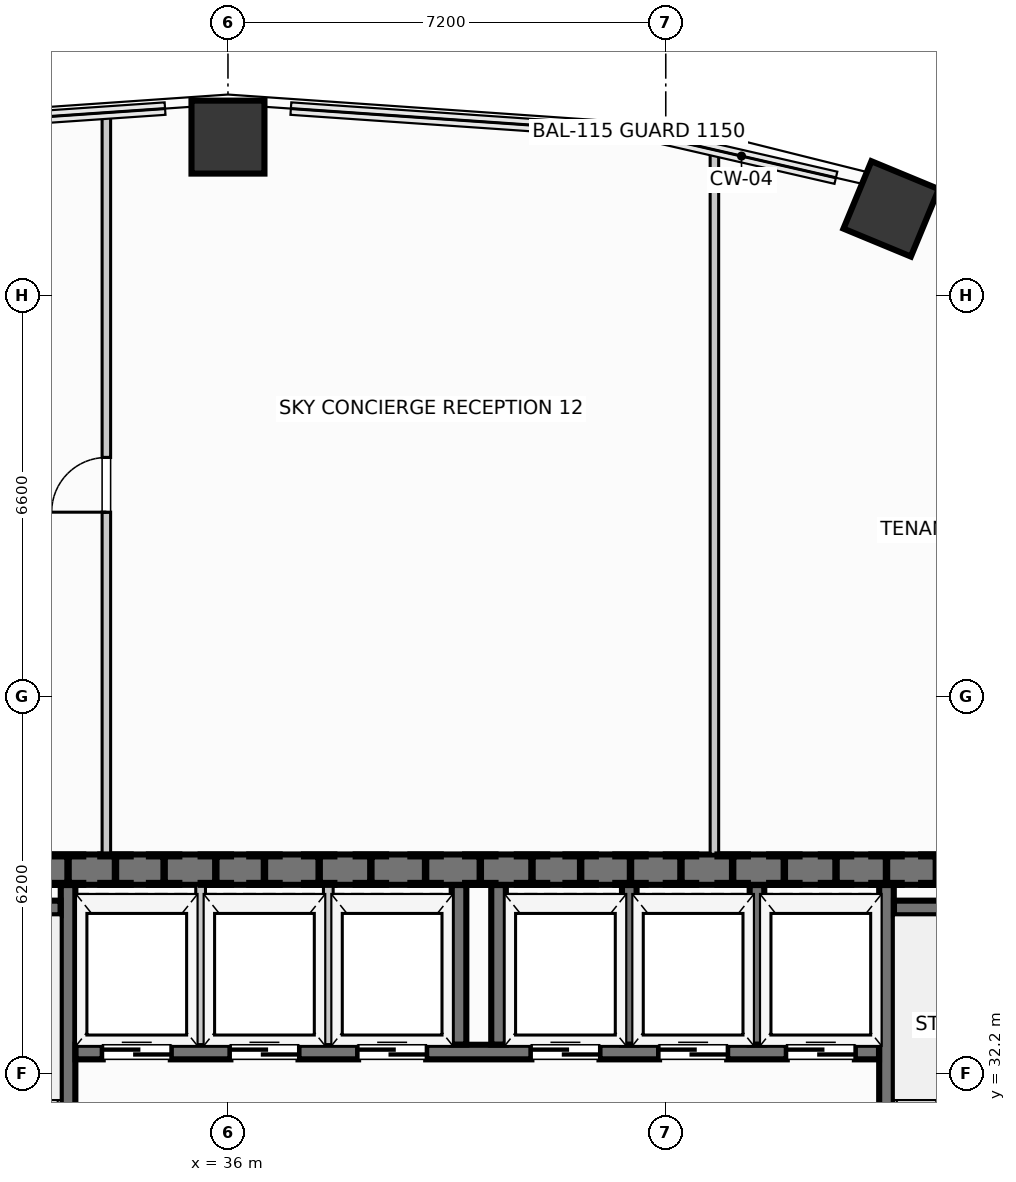
"""IFC4 building model, lengths in metres.
Left out: names, types, materials, properties, quantities, classifications, styles, units other than length and angle.
Written with IfcOpenShell. Run it as: python <this file> out.ifc"""

import sys

from ifc_helpers import new_model, si_unit, direction, frame, frame_2d, origin, origin_2d, place, context, subcontext, project, spatial, rectangle, i_section, extrude, element, fill, save


model = new_model("IFC4")
c1 = context("Model", 3, precision=1e-05, world=origin(), true_north=direction((0.0, 1.0)))
c2 = subcontext(c1, "Body", "Model", "MODEL_VIEW")
j1 = project(units=[si_unit("LENGTHUNIT", "METRE"), si_unit("PLANEANGLEUNIT", "RADIAN")], contexts=[c1])
p1 = place(None, origin())
s1 = spatial("IfcSite", under=j1, at=p1, CompositionType="ELEMENT")
p2 = place(p1, origin())
s2 = spatial("IfcBuilding", under=s1, at=p2, CompositionType="ELEMENT")
p3 = place(p2, frame((0.0, 0.0, 105.95)))
s3 = spatial("IfcBuildingStorey", under=s2, at=p3, CompositionType="ELEMENT", Elevation=105.95)
for number, where, z_axis, x_axis in (
    (1, (33.37, 35.55, 0.0), (0.0, 0.0, 1.0), (1.0, 0.0, 0.0)),
    (2, (34.95, 35.55, 0.0), (0.0, 0.0, 1.0), (1.0, 0.0, 0.0)),
    (3, (36.6, 35.55, 0.0), (0.0, 0.0, 1.0), (1.0, 0.0, 0.0)),
    (4, (38.35, 35.55, 0.0), (0.0, 0.0, 1.0), (1.0, 0.0, 0.0)),
    (5, (40.15, 35.55, 0.0), (0.0, 0.0, 1.0), (1.0, 0.0, 0.0)),
    (6, (41.8, 35.55, 0.0), (0.0, 0.0, 1.0), (1.0, 0.0, 0.0)),
    (7, (43.45, 35.55, 0.0), (0.0, 0.0, 1.0), (1.0, 0.0, 0.0)),
    (8, (45.15, 35.55, 0.0), (0.0, 0.0, 1.0), (1.0, 0.0, 0.0)),
    (9, (46.83, 35.55, 0.0), (0.0, 0.0, 1.0), (1.0, 0.0, 0.0)),
    (10, (37.5, 35.55, 0.0), (0.0, 0.0, 1.0), (1.0, 0.0, 0.0)),
    (11, (42.62, 35.55, 0.0), (0.0, 0.0, 1.0), (1.0, 0.0, 0.0)),
    (12, (47.65, 35.55, 0.0), (0.0, 0.0, 1.0), (1.0, 0.0, 0.0)),
    (13, (34.15, 35.55, 0.0), (0.0, 0.0, 1.0), (1.0, 0.0, 0.0)),
    (14, (35.8, 35.55, 0.0), (0.0, 0.0, 1.0), (1.0, 0.0, 0.0)),
    (15, (39.25, 35.55, 0.0), (0.0, 0.0, 1.0), (1.0, 0.0, 0.0)),
    (16, (41.0, 35.55, 0.0), (0.0, 0.0, 1.0), (1.0, 0.0, 0.0)),
    (17, (44.3, 35.55, 0.0), (0.0, 0.0, 1.0), (1.0, 0.0, 0.0)),
    (18, (46.0, 35.55, 0.0), (0.0, 0.0, 1.0), (1.0, 0.0, 0.0)),
):
    element("IfcColumn", number, at=place(p3, frame(where, z_axis=z_axis, x_axis=x_axis)), inside=s3, PredefinedType="COLUMN", context=c2, shape_type="SweptSolid", body=[
        extrude(i_section(OverallWidth=0.5, OverallDepth=0.5, WebThickness=0.022, FlangeThickness=0.032, at=origin_2d()), origin(), (0.0, 0.0, 1.0), 4.5),
    ])
for number, where, z_axis, x_axis in (
    (19, (46.906, 46.418, 0.0), (0.0, 0.0, 1.0), (0.383, 0.924, 0.0)),
    (20, (36.0, 47.598, 0.0), (0.0, 0.0, 1.0), (0.0, 1.0, 0.0)),
):
    element("IfcColumn", number, at=place(p3, frame(where, z_axis=z_axis, x_axis=x_axis)), inside=s3, PredefinedType="COLUMN", context=c2, shape_type="SweptSolid", body=[
        extrude(rectangle(XDim=1.2, YDim=1.2, at=origin_2d()), origin(), (0.0, 0.0, 1.0), 4.5),
    ])
p4 = place(p3, frame((50.35, 35.55, 0.0), z_axis=(0.0, 0.0, 1.0), x_axis=(-1.0, 0.0, 0.0)))
e21 = element("IfcWall", 21, at=p4, inside=s3, PredefinedType="SHEAR", context=c2, shape_type="SweptSolid", body=[
    extrude(rectangle(XDim=28.7, YDim=0.5, at=frame_2d((14.35, 0.0))), origin(), (0.0, 0.0, 1.0), 4.5),
])
p5 = place(p3, frame((33.37, 27.003, 0.0), z_axis=(0.0, 0.0, 1.0), x_axis=(0.0, 1.0, 0.0)))
e22 = element("IfcWall", 22, at=p5, inside=s3, PredefinedType="SHEAR", context=c2, shape_type="SweptSolid", body=[
    extrude(rectangle(XDim=8.294, YDim=0.24, at=frame_2d((4.147, 0.0))), origin(), (0.0, 0.0, 1.0), 4.5),
])
p6 = place(p3, frame((30.253, 34.92, 0.0), z_axis=(0.0, 0.0, 1.0), x_axis=(1.0, 0.0, 0.0)))
e23 = element("IfcWall", 23, at=p6, inside=s3, PredefinedType="SHEAR", context=c2, shape_type="SweptSolid", body=[
    extrude(rectangle(XDim=2.994, YDim=0.24, at=frame_2d((1.497, 0.0))), origin(), (0.0, 0.0, 1.0), 4.5),
])
p7 = place(p3, frame((46.83, 27.003, 0.0), z_axis=(0.0, 0.0, 1.0), x_axis=(0.0, 1.0, 0.0)))
e24 = element("IfcWall", 24, at=p7, inside=s3, PredefinedType="SHEAR", context=c2, shape_type="SweptSolid", body=[
    extrude(rectangle(XDim=8.294, YDim=0.24, at=frame_2d((4.147, 0.0))), origin(), (0.0, 0.0, 1.0), 4.5),
])
p8 = place(p3, frame((46.953, 34.92, 0.0), z_axis=(0.0, 0.0, 1.0), x_axis=(1.0, 0.0, 0.0)))
e25 = element("IfcWall", 25, at=p8, inside=s3, PredefinedType="SHEAR", context=c2, shape_type="SweptSolid", body=[
    extrude(rectangle(XDim=2.994, YDim=0.24, at=frame_2d((1.497, 0.0))), origin(), (0.0, 0.0, 1.0), 4.5),
])
p9 = place(p3, frame((33.493, 32.55, 0.0), z_axis=(0.0, 0.0, 1.0), x_axis=(1.0, 0.0, 0.0)))
e26 = element("IfcWall", 26, at=p9, inside=s3, PredefinedType="SHEAR", context=c2, shape_type="SweptSolid", body=[
    extrude(rectangle(XDim=13.214, YDim=0.24, at=frame_2d((6.607, 0.0))), origin(), (0.0, 0.0, 1.0), 4.5),
])
p10 = place(p9, frame((0.447, 0.0, 0.0)))
e27 = element("IfcOpeningElement", 27, at=p10, cuts=e26, PredefinedType="OPENING", context=c2, shape_type="SweptSolid", body=[
    extrude(rectangle(XDim=1.12, YDim=2.0, at=frame_2d((0.56, 1.0))), frame((0.0, 0.13, 0.0), z_axis=(0.0, -1.0, 0.0), x_axis=(1.0, 0.0, 0.0)), (0.0, 0.0, 1.0), 0.26),
])
p11 = place(p9, frame((2.547, 0.0, 0.0)))
e28 = element("IfcOpeningElement", 28, at=p11, cuts=e26, PredefinedType="OPENING", context=c2, shape_type="SweptSolid", body=[
    extrude(rectangle(XDim=1.12, YDim=2.0, at=frame_2d((0.56, 1.0))), frame((0.0, 0.13, 0.0), z_axis=(0.0, -1.0, 0.0), x_axis=(1.0, 0.0, 0.0)), (0.0, 0.0, 1.0), 0.26),
])
p12 = place(p9, frame((4.647, 0.0, 0.0)))
e29 = element("IfcOpeningElement", 29, at=p12, cuts=e26, PredefinedType="OPENING", context=c2, shape_type="SweptSolid", body=[
    extrude(rectangle(XDim=1.12, YDim=2.0, at=frame_2d((0.56, 1.0))), frame((0.0, 0.13, 0.0), z_axis=(0.0, -1.0, 0.0), x_axis=(1.0, 0.0, 0.0)), (0.0, 0.0, 1.0), 0.26),
])
p13 = place(p9, frame((7.497, 0.0, 0.0)))
e30 = element("IfcOpeningElement", 30, at=p13, cuts=e26, PredefinedType="OPENING", context=c2, shape_type="SweptSolid", body=[
    extrude(rectangle(XDim=1.12, YDim=2.0, at=frame_2d((0.56, 1.0))), frame((0.0, 0.13, 0.0), z_axis=(0.0, -1.0, 0.0), x_axis=(1.0, 0.0, 0.0)), (0.0, 0.0, 1.0), 0.26),
])
p14 = place(p9, frame((9.597, 0.0, 0.0)))
e31 = element("IfcOpeningElement", 31, at=p14, cuts=e26, PredefinedType="OPENING", context=c2, shape_type="SweptSolid", body=[
    extrude(rectangle(XDim=1.12, YDim=2.0, at=frame_2d((0.56, 1.0))), frame((0.0, 0.13, 0.0), z_axis=(0.0, -1.0, 0.0), x_axis=(1.0, 0.0, 0.0)), (0.0, 0.0, 1.0), 0.26),
])
p15 = place(p9, frame((11.697, 0.0, 0.0)))
e32 = element("IfcOpeningElement", 32, at=p15, cuts=e26, PredefinedType="OPENING", context=c2, shape_type="SweptSolid", body=[
    extrude(rectangle(XDim=1.12, YDim=2.0, at=frame_2d((0.56, 1.0))), frame((0.0, 0.13, 0.0), z_axis=(0.0, -1.0, 0.0), x_axis=(1.0, 0.0, 0.0)), (0.0, 0.0, 1.0), 0.26),
])
for number, where, z_axis, x_axis in (
    (33, (39.8, 32.673, 0.0), (0.0, 0.0, 1.0), (0.0, 1.0, 0.0)),
    (34, (40.45, 32.673, 0.0), (0.0, 0.0, 1.0), (0.0, 1.0, 0.0)),
    (35, (42.6, 32.673, 0.0), (0.0, 0.0, 1.0), (0.0, 1.0, 0.0)),
    (36, (44.7, 32.673, 0.0), (0.0, 0.0, 1.0), (0.0, 1.0, 0.0)),
):
    element("IfcWall", number, at=place(p3, frame(where, z_axis=z_axis, x_axis=x_axis)), inside=s3, PredefinedType="SHEAR", context=c2, shape_type="SweptSolid", body=[
        extrude(rectangle(XDim=2.624, YDim=0.24, at=frame_2d((1.312, 0.0))), origin(), (0.0, 0.0, 1.0), 4.5),
    ])
for number, where, z_axis, x_axis in (
    (37, (35.55, 32.673, 0.0), (0.0, 0.0, 1.0), (0.0, 1.0, 0.0)),
    (38, (37.65, 32.673, 0.0), (0.0, 0.0, 1.0), (0.0, 1.0, 0.0)),
):
    element("IfcWall", number, at=place(p3, frame(where, z_axis=z_axis, x_axis=x_axis)), inside=s3, PredefinedType="MOVABLE", context=c2, shape_type="SweptSolid", body=[
        extrude(rectangle(XDim=2.624, YDim=0.16, at=frame_2d((1.312, 0.0))), origin(), (0.0, 0.0, 1.0), 4.245),
    ])
p16 = place(p3, frame((34.0, 35.803, 0.0), z_axis=(0.0, 0.0, 1.0), x_axis=(0.0, 1.0, 0.0)))
e39 = element("IfcWall", 39, at=p16, inside=s3, PredefinedType="PARTITIONING", context=c2, shape_type="SweptSolid", body=[
    extrude(rectangle(XDim=12.133, YDim=0.14, at=frame_2d((6.066, 0.0))), origin(), (0.0, 0.0, 1.0), 4.245),
])
p17 = place(p16, frame((5.626, 0.0, 0.0)))
e40 = element("IfcOpeningElement", 40, at=p17, cuts=e39, PredefinedType="OPENING", context=c2, shape_type="SweptSolid", body=[
    extrude(rectangle(XDim=0.9, YDim=2.0, at=frame_2d((0.45, 1.0))), frame((0.0, 0.08, 0.0), z_axis=(0.0, -1.0, 0.0), x_axis=(1.0, 0.0, 0.0)), (0.0, 0.0, 1.0), 0.16),
])
p18 = place(p3, frame((44.0, 35.803, 0.0), z_axis=(0.0, 0.0, 1.0), x_axis=(0.0, 1.0, 0.0)))
e41 = element("IfcWall", 41, at=p18, inside=s3, PredefinedType="PARTITIONING", context=c2, shape_type="SweptSolid", body=[
    extrude(rectangle(XDim=11.519, YDim=0.14, at=frame_2d((5.76, 0.0))), origin(), (0.0, 0.0, 1.0), 4.245),
])
p19 = place(p10, origin())
e42 = element("IfcDoor", 42, at=p19, inside=s3, OperationType="DOUBLE_DOOR_SLIDING", PredefinedType="USERDEFINED", context=c2, shape_type="SweptSolid", body=[
    extrude(rectangle(XDim=1.12, YDim=2.0, at=frame_2d((0.56, 1.0))), frame((0.0, 0.025, 0.0), z_axis=(0.0, -1.0, 0.0), x_axis=(1.0, 0.0, 0.0)), (0.0, 0.0, 1.0), 0.05),
])
fill(e27, e42)
p20 = place(p11, origin())
e43 = element("IfcDoor", 43, at=p20, inside=s3, OperationType="DOUBLE_DOOR_SLIDING", PredefinedType="USERDEFINED", context=c2, shape_type="SweptSolid", body=[
    extrude(rectangle(XDim=1.12, YDim=2.0, at=frame_2d((0.56, 1.0))), frame((0.0, 0.025, 0.0), z_axis=(0.0, -1.0, 0.0), x_axis=(1.0, 0.0, 0.0)), (0.0, 0.0, 1.0), 0.05),
])
fill(e28, e43)
p21 = place(p12, origin())
e44 = element("IfcDoor", 44, at=p21, inside=s3, OperationType="DOUBLE_DOOR_SLIDING", PredefinedType="USERDEFINED", context=c2, shape_type="SweptSolid", body=[
    extrude(rectangle(XDim=1.12, YDim=2.0, at=frame_2d((0.56, 1.0))), frame((0.0, 0.025, 0.0), z_axis=(0.0, -1.0, 0.0), x_axis=(1.0, 0.0, 0.0)), (0.0, 0.0, 1.0), 0.05),
])
fill(e29, e44)
p22 = place(p13, origin())
e45 = element("IfcDoor", 45, at=p22, inside=s3, OperationType="DOUBLE_DOOR_SLIDING", PredefinedType="USERDEFINED", context=c2, shape_type="SweptSolid", body=[
    extrude(rectangle(XDim=1.12, YDim=2.0, at=frame_2d((0.56, 1.0))), frame((0.0, 0.025, 0.0), z_axis=(0.0, -1.0, 0.0), x_axis=(1.0, 0.0, 0.0)), (0.0, 0.0, 1.0), 0.05),
])
fill(e30, e45)
p23 = place(p14, origin())
e46 = element("IfcDoor", 46, at=p23, inside=s3, OperationType="DOUBLE_DOOR_SLIDING", PredefinedType="USERDEFINED", context=c2, shape_type="SweptSolid", body=[
    extrude(rectangle(XDim=1.12, YDim=2.0, at=frame_2d((0.56, 1.0))), frame((0.0, 0.025, 0.0), z_axis=(0.0, -1.0, 0.0), x_axis=(1.0, 0.0, 0.0)), (0.0, 0.0, 1.0), 0.05),
])
fill(e31, e46)
p24 = place(p15, origin())
e47 = element("IfcDoor", 47, at=p24, inside=s3, OperationType="DOUBLE_DOOR_SLIDING", PredefinedType="USERDEFINED", context=c2, shape_type="SweptSolid", body=[
    extrude(rectangle(XDim=1.12, YDim=2.0, at=frame_2d((0.56, 1.0))), frame((0.0, 0.025, 0.0), z_axis=(0.0, -1.0, 0.0), x_axis=(1.0, 0.0, 0.0)), (0.0, 0.0, 1.0), 0.05),
])
fill(e32, e47)
p25 = place(p17, origin())
e48 = element("IfcDoor", 48, at=p25, inside=s3, OperationType="SINGLE_SWING_LEFT", PredefinedType="DOOR", context=c2, shape_type="SweptSolid", body=[
    extrude(rectangle(XDim=0.9, YDim=2.0, at=frame_2d((0.45, 1.0))), frame((0.0, 0.025, 0.0), z_axis=(0.0, -1.0, 0.0), x_axis=(1.0, 0.0, 0.0)), (0.0, 0.0, 1.0), 0.05),
])
fill(e40, e48)
save(model, sys.argv[1])
